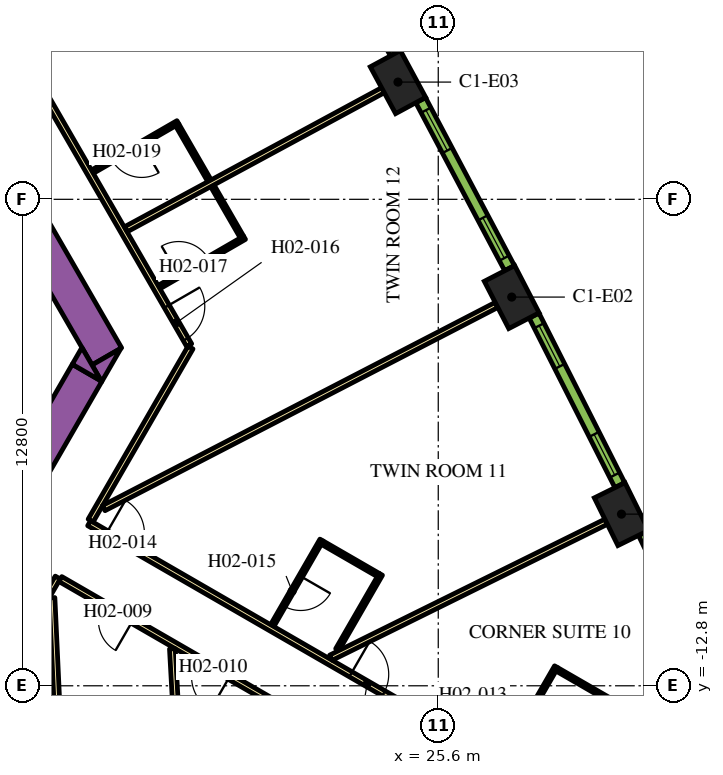
"""IFC4 building model, lengths in metres.
Left out: names, types, materials, properties, quantities, classifications, styles, units other than length and angle.
Written with IfcOpenShell. Run it as: python <this file> out.ifc"""

import sys

from ifc_helpers import new_model, si_unit, direction, frame, frame_2d, origin, origin_2d, place, context, subcontext, project, spatial, polyline, rectangle, outline, extrude, element, fill, save


model = new_model("IFC4")
c1 = context("Model", 3, precision=1e-05, world=origin(), true_north=direction((0.0, 1.0)))
c2 = subcontext(c1, "Body", "Model", "MODEL_VIEW")
j1 = project(units=[si_unit("LENGTHUNIT", "METRE"), si_unit("PLANEANGLEUNIT", "RADIAN")], contexts=[c1])
p1 = place(None, origin())
s1 = spatial("IfcSite", under=j1, at=p1, CompositionType="ELEMENT")
p2 = place(p1, origin())
s2 = spatial("IfcBuilding", under=s1, at=p2, CompositionType="ELEMENT")
p3 = place(p2, frame((0.0, 0.0, 39.3)))
s3 = spatial("IfcBuildingStorey", under=s2, at=p3, CompositionType="ELEMENT", Elevation=39.3)
for number, where, z_axis, x_axis in (
    (1, (30.421, -8.284, 0.0), (0.0, 0.0, 1.0), (-0.443, 0.897, 0.0)),
    (2, (27.533, -2.572, 0.0), (0.0, 0.0, 1.0), (-0.459, 0.888, 0.0)),
    (3, (24.54, 3.085, 0.0), (0.0, 0.0, 1.0), (-0.476, 0.88, 0.0)),
):
    element("IfcColumn", number, at=place(p3, frame(where, z_axis=z_axis, x_axis=x_axis)), inside=s3, PredefinedType="COLUMN", context=c2, shape_type="SweptSolid", body=[
        extrude(rectangle(XDim=1.4, YDim=0.9, at=origin_2d()), origin(), (0.0, 0.0, 1.0), 3.9),
    ])
p4 = place(p3, frame((6.711, 13.476, 0.0), z_axis=(0.0, 0.0, 1.0), x_axis=(0.500002723396, -0.866023831425, 0.0)))
e4 = element("IfcWall", 4, at=p4, inside=s3, PredefinedType="SOLIDWALL", context=c2, shape_type="SweptSolid", body=[
    extrude(rectangle(XDim=20.334, YDim=0.9, at=frame_2d((10.167, 0.0))), origin(), (0.0, 0.0, 1.0), 3.9),
])
p5 = place(p3, origin())
e5 = element("IfcWall", 5, at=p5, inside=s3, PredefinedType="SOLIDWALL", context=c2, shape_type="SweptSolid", body=[
    extrude(outline(polyline([(16.743, -4.8), (16.489, -4.36), (17.251, -3.92), (16.743, -4.8)])), origin(), (0.0, 0.0, 1.0), 3.9),
])
p6 = place(p3, frame((11.695, -12.644, 0.0), z_axis=(0.0, 0.0, 1.0), x_axis=(0.500010229568, 0.86601949766, 0.0)))
e6 = element("IfcWall", 6, at=p6, inside=s3, PredefinedType="SOLIDWALL", context=c2, shape_type="SweptSolid", body=[
    extrude(rectangle(XDim=9.326, YDim=0.9, at=frame_2d((4.663, 0.0))), origin(), (0.0, 0.0, 1.0), 3.9),
])
e7 = element("IfcWall", 7, at=p5, inside=s3, PredefinedType="SOLIDWALL", context=c2, shape_type="SweptSolid", body=[
    extrude(outline(polyline([(16.223, -3.9), (16.732, -4.78), (15.969, -4.34), (16.223, -3.9)])), origin(), (0.0, 0.0, 1.0), 3.9),
])
p7 = place(p3, frame((16.412, -8.523, 0.0), z_axis=(0.0, 0.0, 1.0), x_axis=(0.866022197818, -0.500005552856, 0.0)))
e8 = element("IfcWall", 8, at=p7, inside=s3, PredefinedType="PARTITIONING", context=c2, shape_type="SweptSolid", body=[
    extrude(rectangle(XDim=16.224, YDim=0.15, at=frame_2d((8.112, 0.0))), origin(), (0.0, 0.0, 1.0), 2.75),
])
p8 = place(p7, frame((7.949, 0.0, 0.0)))
e9 = element("IfcOpeningElement", 9, at=p8, cuts=e8, PredefinedType="OPENING", context=c2, shape_type="SweptSolid", body=[
    extrude(rectangle(XDim=1.0, YDim=2.1, at=frame_2d((0.5, 1.05))), frame((0.0, 0.085, 0.0), z_axis=(0.0, -1.0, 0.0), x_axis=(1.0, 0.0, 0.0)), (0.0, 0.0, 1.0), 0.17),
])
p9 = place(p7, frame((0.526, 0.0, 0.0)))
e10 = element("IfcOpeningElement", 10, at=p9, cuts=e8, PredefinedType="OPENING", context=c2, shape_type="SweptSolid", body=[
    extrude(rectangle(XDim=1.0, YDim=2.1, at=frame_2d((0.5, 1.05))), frame((0.0, 0.085, 0.0), z_axis=(0.0, -1.0, 0.0), x_axis=(1.0, 0.0, 0.0)), (0.0, 0.0, 1.0), 0.17),
])
p10 = place(p3, frame((19.081, -3.9, 0.0), z_axis=(0.0, 0.0, 1.0), x_axis=(-0.499974327079, -0.866040225545, 0.0)))
e11 = element("IfcWall", 11, at=p10, inside=s3, PredefinedType="PARTITIONING", context=c2, shape_type="SweptSolid", body=[
    extrude(rectangle(XDim=5.258, YDim=0.15, at=frame_2d((2.629, 0.0))), origin(), (0.0, 0.0, 1.0), 2.75),
])
p11 = place(p3, frame((6.163, 18.475, 0.0), z_axis=(0.0, 0.0, 1.0), x_axis=(0.500001317485, -0.866024643133, 0.0)))
e12 = element("IfcWall", 12, at=p11, inside=s3, PredefinedType="PARTITIONING", context=c2, shape_type="SweptSolid", body=[
    extrude(rectangle(XDim=25.767, YDim=0.15, at=frame_2d((12.883, 0.0))), origin(), (0.0, 0.0, 1.0), 2.75),
])
p12 = place(p11, frame((24.586, 0.0, 0.0)))
e13 = element("IfcOpeningElement", 13, at=p12, cuts=e12, PredefinedType="OPENING", context=c2, shape_type="SweptSolid", body=[
    extrude(rectangle(XDim=1.0, YDim=2.1, at=frame_2d((0.5, 1.05))), frame((0.0, 0.085, 0.0), z_axis=(0.0, -1.0, 0.0), x_axis=(1.0, 0.0, 0.0)), (0.0, 0.0, 1.0), 0.17),
])
p13 = place(p11, frame((16.196, 0.0, 0.0)))
e14 = element("IfcOpeningElement", 14, at=p13, cuts=e12, PredefinedType="OPENING", context=c2, shape_type="SweptSolid", body=[
    extrude(rectangle(XDim=1.0, YDim=2.1, at=frame_2d((0.5, 1.05))), frame((0.0, 0.085, 0.0), z_axis=(0.0, -1.0, 0.0), x_axis=(1.0, 0.0, 0.0)), (0.0, 0.0, 1.0), 0.17),
])
p14 = place(p11, frame((14.789, 0.0, 0.0)))
e15 = element("IfcOpeningElement", 15, at=p14, cuts=e12, PredefinedType="OPENING", context=c2, shape_type="SweptSolid", body=[
    extrude(rectangle(XDim=1.1, YDim=2.1, at=frame_2d((0.55, 1.05))), frame((0.0, 0.085, 0.0), z_axis=(0.0, -1.0, 0.0), x_axis=(1.0, 0.0, 0.0)), (0.0, 0.0, 1.0), 0.17),
])
p15 = place(p11, frame((3.698, 0.0, 0.0)))
e16 = element("IfcOpeningElement", 16, at=p15, cuts=e12, PredefinedType="OPENING", context=c2, shape_type="SweptSolid", body=[
    extrude(rectangle(XDim=1.0, YDim=2.1, at=frame_2d((0.5, 1.05))), frame((0.0, 0.085, 0.0), z_axis=(0.0, -1.0, 0.0), x_axis=(1.0, 0.0, 0.0)), (0.0, 0.0, 1.0), 0.17),
])
p16 = place(p11, frame((2.391, 0.0, 0.0)))
e17 = element("IfcOpeningElement", 17, at=p16, cuts=e12, PredefinedType="OPENING", context=c2, shape_type="SweptSolid", body=[
    extrude(rectangle(XDim=1.0, YDim=2.1, at=frame_2d((0.5, 1.05))), frame((0.0, 0.085, 0.0), z_axis=(0.0, -1.0, 0.0), x_axis=(1.0, 0.0, 0.0)), (0.0, 0.0, 1.0), 0.17),
])
p17 = place(p3, frame((15.587, -9.952, 0.0), z_axis=(0.0, 0.0, 1.0), x_axis=(-0.500016618951, -0.866015808616, 0.0)))
e18 = element("IfcWall", 18, at=p17, inside=s3, PredefinedType="PARTITIONING", context=c2, shape_type="SweptSolid", body=[
    extrude(rectangle(XDim=5.268, YDim=0.15, at=frame_2d((2.634, 0.0))), origin(), (0.0, 0.0, 1.0), 2.75),
])
p18 = place(p17, frame((2.465, 0.0, 0.0)))
e19 = element("IfcOpeningElement", 19, at=p18, cuts=e18, PredefinedType="OPENING", context=c2, shape_type="SweptSolid", body=[
    extrude(rectangle(XDim=0.9, YDim=2.1, at=frame_2d((0.45, 1.05))), frame((0.0, 0.085, 0.0), z_axis=(0.0, -1.0, 0.0), x_axis=(1.0, 0.0, 0.0)), (0.0, 0.0, 1.0), 0.17),
])
p19 = place(p3, frame((29.638, -18.064, 0.0), z_axis=(0.0, 0.0, 1.0), x_axis=(-0.866026175601, 0.499998663172, 0.0)))
e20 = element("IfcWall", 20, at=p19, inside=s3, PredefinedType="PARTITIONING", context=c2, shape_type="SweptSolid", body=[
    extrude(rectangle(XDim=16.144, YDim=0.15, at=frame_2d((8.072, 0.0))), origin(), (0.0, 0.0, 1.0), 2.75),
])
p20 = place(p19, frame((13.948, 0.0, 0.0)))
e21 = element("IfcOpeningElement", 21, at=p20, cuts=e20, PredefinedType="OPENING", context=c2, shape_type="SweptSolid", body=[
    extrude(rectangle(XDim=0.9, YDim=2.1, at=frame_2d((0.45, 1.05))), frame((0.0, 0.085, 0.0), z_axis=(0.0, -1.0, 0.0), x_axis=(1.0, 0.0, 0.0)), (0.0, 0.0, 1.0), 0.17),
])
p21 = place(p19, frame((11.004, 0.0, 0.0)))
e22 = element("IfcOpeningElement", 22, at=p21, cuts=e20, PredefinedType="OPENING", context=c2, shape_type="SweptSolid", body=[
    extrude(rectangle(XDim=1.0, YDim=2.1, at=frame_2d((0.5, 1.05))), frame((0.0, 0.085, 0.0), z_axis=(0.0, -1.0, 0.0), x_axis=(1.0, 0.0, 0.0)), (0.0, 0.0, 1.0), 0.17),
])
p22 = place(p3, frame((15.973, -22.109, 0.0), z_axis=(0.0, 0.0, 1.0), x_axis=(-0.046191717129, 0.998932592955, 0.0)))
e23 = element("IfcWall", 23, at=p22, inside=s3, PredefinedType="PARTITIONING", context=c2, shape_type="SweptSolid", body=[
    extrude(rectangle(XDim=11.638, YDim=0.15, at=frame_2d((5.819, 0.0))), origin(), (0.0, 0.0, 1.0), 2.75),
])
p23 = place(p3, frame((27.134, -2.779, 0.0), z_axis=(0.0, 0.0, 1.0), x_axis=(-0.8882049501, -0.459447457951, 0.0)))
e24 = element("IfcWall", 24, at=p23, inside=s3, PredefinedType="PARTITIONING", context=c2, shape_type="SweptSolid", body=[
    extrude(rectangle(XDim=11.638, YDim=0.15, at=frame_2d((5.819, 0.0))), origin(), (0.0, 0.0, 1.0), 2.75),
])
p24 = place(p3, frame((24.145, 2.871, 0.0), z_axis=(0.0, 0.0, 1.0), x_axis=(-0.879551725039, -0.475803281809, 0.0)))
e25 = element("IfcWall", 25, at=p24, inside=s3, PredefinedType="PARTITIONING", context=c2, shape_type="SweptSolid", body=[
    extrude(rectangle(XDim=7.688, YDim=0.15, at=frame_2d((3.844, 0.0))), origin(), (0.0, 0.0, 1.0), 2.75),
])
p25 = place(p3, frame((19.198, -22.541, 0.0), z_axis=(0.0, 0.0, 1.0), x_axis=(-0.055432210572, 0.99846245299, 0.0)))
e26 = element("IfcWall", 26, at=p25, inside=s3, PredefinedType="PARTITIONING", context=c2, shape_type="SweptSolid", body=[
    extrude(rectangle(XDim=10.729, YDim=0.15, at=frame_2d((5.365, 0.0))), origin(), (0.0, 0.0, 1.0), 2.75),
])
p26 = place(p3, frame((30.018, -8.483, 0.0), z_axis=(0.0, 0.0, 1.0), x_axis=(-0.896544505264, -0.44295366584, 0.0)))
e27 = element("IfcWall", 27, at=p26, inside=s3, PredefinedType="PARTITIONING", context=c2, shape_type="SweptSolid", body=[
    extrude(rectangle(XDim=8.079, YDim=0.15, at=frame_2d((4.04, 0.0))), origin(), (0.0, 0.0, 1.0), 2.75),
])
p27 = place(p3, frame((28.704, -12.3, 0.0), z_axis=(0.0, 0.0, 1.0), x_axis=(-0.49998411664, -0.866034573852, 0.0)))
e28 = element("IfcWall", 28, at=p27, inside=s3, PredefinedType="PARTITIONING", context=c2, shape_type="SweptSolid", body=[
    extrude(rectangle(XDim=2.8, YDim=0.1, at=frame_2d((1.4, 0.0))), origin(), (0.0, 0.0, 1.0), 2.75),
])
p28 = place(p27, frame((1.3, 0.0, 0.0)))
e29 = element("IfcOpeningElement", 29, at=p28, cuts=e28, PredefinedType="OPENING", context=c2, shape_type="SweptSolid", body=[
    extrude(rectangle(XDim=0.9, YDim=2.1, at=frame_2d((0.45, 1.05))), frame((0.0, 0.06, 0.0), z_axis=(0.0, -1.0, 0.0), x_axis=(1.0, 0.0, 0.0)), (0.0, 0.0, 1.0), 0.12),
])
p29 = place(p3, frame((28.722, -12.368, 0.0), z_axis=(0.0, 0.0, 1.0), x_axis=(0.866050077142, -0.499957262057, 0.0)))
e30 = element("IfcWall", 30, at=p29, inside=s3, PredefinedType="PARTITIONING", context=c2, shape_type="SweptSolid", body=[
    extrude(rectangle(XDim=2.4, YDim=0.1, at=frame_2d((1.2, 0.0))), origin(), (0.0, 0.0, 1.0), 2.75),
])
p30 = place(p3, frame((22.53, -8.966, 0.0), z_axis=(0.0, 0.0, 1.0), x_axis=(-0.500006934395, -0.866021400173, 0.0)))
e31 = element("IfcWall", 31, at=p30, inside=s3, PredefinedType="PARTITIONING", context=c2, shape_type="SweptSolid", body=[
    extrude(rectangle(XDim=2.6, YDim=0.1, at=frame_2d((1.3, 0.0))), origin(), (0.0, 0.0, 1.0), 2.75),
])
p31 = place(p30, frame((1.1, 0.0, 0.0)))
e32 = element("IfcOpeningElement", 32, at=p31, cuts=e31, PredefinedType="OPENING", context=c2, shape_type="SweptSolid", body=[
    extrude(rectangle(XDim=0.9, YDim=2.1, at=frame_2d((0.45, 1.05))), frame((0.0, 0.06, 0.0), z_axis=(0.0, -1.0, 0.0), x_axis=(1.0, 0.0, 0.0)), (0.0, 0.0, 1.0), 0.12),
])
p32 = place(p3, frame((22.549, -9.035, 0.0), z_axis=(0.0, 0.0, 1.0), x_axis=(0.86605165483, -0.499954529098, 0.0)))
e33 = element("IfcWall", 33, at=p32, inside=s3, PredefinedType="PARTITIONING", context=c2, shape_type="SweptSolid", body=[
    extrude(rectangle(XDim=1.7, YDim=0.1, at=frame_2d((0.85, 0.0))), origin(), (0.0, 0.0, 1.0), 2.75),
])
p33 = place(p3, frame((22.944, -11.85, 0.0), z_axis=(0.0, 0.0, 1.0), x_axis=(0.499968531483, 0.866043571379, 0.0)))
e34 = element("IfcWall", 34, at=p33, inside=s3, PredefinedType="PARTITIONING", context=c2, shape_type="SweptSolid", body=[
    extrude(rectangle(XDim=2.29, YDim=0.1, at=frame_2d((1.145, 0.0))), origin(), (0.0, 0.0, 1.0), 2.75),
])
p34 = place(p3, frame((18.25, -2.311, 0.0), z_axis=(0.0, 0.0, 1.0), x_axis=(0.866021400173, 0.500006934395, 0.0)))
e35 = element("IfcWall", 35, at=p34, inside=s3, PredefinedType="PARTITIONING", context=c2, shape_type="SweptSolid", body=[
    extrude(rectangle(XDim=2.6, YDim=0.1, at=frame_2d((1.3, 0.0))), origin(), (0.0, 0.0, 1.0), 2.75),
])
p35 = place(p34, frame((0.6, 0.0, 0.0)))
e36 = element("IfcOpeningElement", 36, at=p35, cuts=e35, PredefinedType="OPENING", context=c2, shape_type="SweptSolid", body=[
    extrude(rectangle(XDim=0.9, YDim=2.1, at=frame_2d((0.45, 1.05))), frame((0.0, 0.06, 0.0), z_axis=(0.0, -1.0, 0.0), x_axis=(1.0, 0.0, 0.0)), (0.0, 0.0, 1.0), 0.12),
])
p36 = place(p3, frame((20.434, -0.993, 0.0), z_axis=(0.0, 0.0, 1.0), x_axis=(-0.500086022567, 0.865975732936, 0.0)))
e37 = element("IfcWall", 37, at=p36, inside=s3, PredefinedType="PARTITIONING", context=c2, shape_type="SweptSolid", body=[
    extrude(rectangle(XDim=1.55, YDim=0.1, at=frame_2d((0.775, 0.0))), origin(), (0.0, 0.0, 1.0), 2.75),
])
p37 = place(p3, frame((18.749, 2.026, 0.0), z_axis=(0.0, 0.0, 1.0), x_axis=(-0.866021400173, -0.500006934395, 0.0)))
e38 = element("IfcWall", 38, at=p37, inside=s3, PredefinedType="PARTITIONING", context=c2, shape_type="SweptSolid", body=[
    extrude(rectangle(XDim=2.6, YDim=0.1, at=frame_2d((1.3, 0.0))), origin(), (0.0, 0.0, 1.0), 2.75),
])
p38 = place(p37, frame((1.1, 0.0, 0.0)))
e39 = element("IfcOpeningElement", 39, at=p38, cuts=e38, PredefinedType="OPENING", context=c2, shape_type="SweptSolid", body=[
    extrude(rectangle(XDim=0.9, YDim=2.1, at=frame_2d((0.45, 1.05))), frame((0.0, 0.06, 0.0), z_axis=(0.0, -1.0, 0.0), x_axis=(1.0, 0.0, 0.0)), (0.0, 0.0, 1.0), 0.12),
])
p39 = place(p3, frame((18.731, 1.958, 0.0), z_axis=(0.0, 0.0, 1.0), x_axis=(0.499976720371, -0.866038843867, 0.0)))
e40 = element("IfcWall", 40, at=p39, inside=s3, PredefinedType="PARTITIONING", context=c2, shape_type="SweptSolid", body=[
    extrude(rectangle(XDim=1.69, YDim=0.1, at=frame_2d((0.845, 0.0))), origin(), (0.0, 0.0, 1.0), 2.75),
])
p40 = place(p3, frame((33.176, -13.29, 0.0), z_axis=(0.0, 0.0, 1.0), x_axis=(-0.434664499056, 0.900592456808, 0.0)))
e41 = element("IfcWall", 41, at=p40, inside=s3, PredefinedType="SOLIDWALL", context=c2, shape_type="SweptSolid", body=[
    extrude(rectangle(XDim=5.006, YDim=0.29, at=frame_2d((2.503, 0.0))), origin(), (0.0, 0.0, 1.0), 3.65),
])
p41 = place(p40, frame((0.265, 0.0, 0.9)))
e42 = element("IfcOpeningElement", 42, at=p41, cuts=e41, PredefinedType="OPENING", context=c2, shape_type="SweptSolid", body=[
    extrude(rectangle(XDim=1.2, YDim=2.15, at=frame_2d((0.6, 1.075))), frame((0.0, 0.155, 0.0), z_axis=(0.0, -1.0, 0.0), x_axis=(1.0, 0.0, 0.0)), (0.0, 0.0, 1.0), 0.31),
])
p42 = place(p40, frame((3.496, 0.0, 0.9)))
e43 = element("IfcOpeningElement", 43, at=p42, cuts=e41, PredefinedType="OPENING", context=c2, shape_type="SweptSolid", body=[
    extrude(rectangle(XDim=1.2, YDim=2.15, at=frame_2d((0.6, 1.075))), frame((0.0, 0.155, 0.0), z_axis=(0.0, -1.0, 0.0), x_axis=(1.0, 0.0, 0.0)), (0.0, 0.0, 1.0), 0.31),
])
p43 = place(p3, frame((30.377, -7.521, 0.0), z_axis=(0.0, 0.0, 1.0), x_axis=(-0.451233929645, 0.892405704115, 0.0)))
e44 = element("IfcWall", 44, at=p43, inside=s3, PredefinedType="SOLIDWALL", context=c2, shape_type="SweptSolid", body=[
    extrude(rectangle(XDim=4.998, YDim=0.29, at=frame_2d((2.499, 0.0))), origin(), (0.0, 0.0, 1.0), 3.65),
])
p44 = place(p43, frame((0.297, 0.0, 0.9)))
e45 = element("IfcOpeningElement", 45, at=p44, cuts=e44, PredefinedType="OPENING", context=c2, shape_type="SweptSolid", body=[
    extrude(rectangle(XDim=1.2, YDim=2.15, at=frame_2d((0.6, 1.075))), frame((0.0, 0.155, 0.0), z_axis=(0.0, -1.0, 0.0), x_axis=(1.0, 0.0, 0.0)), (0.0, 0.0, 1.0), 0.31),
])
p45 = place(p43, frame((3.501, 0.0, 0.9)))
e46 = element("IfcOpeningElement", 46, at=p45, cuts=e44, PredefinedType="OPENING", context=c2, shape_type="SweptSolid", body=[
    extrude(rectangle(XDim=1.2, YDim=2.15, at=frame_2d((0.6, 1.075))), frame((0.0, 0.155, 0.0), z_axis=(0.0, -1.0, 0.0), x_axis=(1.0, 0.0, 0.0)), (0.0, 0.0, 1.0), 0.31),
])
p46 = place(p3, frame((27.475, -1.81, 0.0), z_axis=(0.0, 0.0, 1.0), x_axis=(-0.467629620899, 0.883924509026, 0.0)))
e47 = element("IfcWall", 47, at=p46, inside=s3, PredefinedType="SOLIDWALL", context=c2, shape_type="SweptSolid", body=[
    extrude(rectangle(XDim=4.998, YDim=0.29, at=frame_2d((2.499, 0.0))), origin(), (0.0, 0.0, 1.0), 3.65),
])
p47 = place(p46, frame((0.297, 0.0, 0.9)))
e48 = element("IfcOpeningElement", 48, at=p47, cuts=e47, PredefinedType="OPENING", context=c2, shape_type="SweptSolid", body=[
    extrude(rectangle(XDim=1.2, YDim=2.15, at=frame_2d((0.6, 1.075))), frame((0.0, 0.155, 0.0), z_axis=(0.0, -1.0, 0.0), x_axis=(1.0, 0.0, 0.0)), (0.0, 0.0, 1.0), 0.31),
])
p48 = place(p46, frame((3.501, 0.0, 0.9)))
e49 = element("IfcOpeningElement", 49, at=p48, cuts=e47, PredefinedType="OPENING", context=c2, shape_type="SweptSolid", body=[
    extrude(rectangle(XDim=1.2, YDim=2.15, at=frame_2d((0.6, 1.075))), frame((0.0, 0.155, 0.0), z_axis=(0.0, -1.0, 0.0), x_axis=(1.0, 0.0, 0.0)), (0.0, 0.0, 1.0), 0.31),
])
p49 = place(p3, frame((24.468, 3.846, 0.0), z_axis=(0.0, 0.0, 1.0), x_axis=(-0.483912572871, 0.875116347589, 0.0)))
e50 = element("IfcWall", 50, at=p49, inside=s3, PredefinedType="SOLIDWALL", context=c2, shape_type="SweptSolid", body=[
    extrude(rectangle(XDim=4.998, YDim=0.29, at=frame_2d((2.499, 0.0))), origin(), (0.0, 0.0, 1.0), 3.65),
])
p50 = place(p49, frame((0.297, 0.0, 0.9)))
e51 = element("IfcOpeningElement", 51, at=p50, cuts=e50, PredefinedType="OPENING", context=c2, shape_type="SweptSolid", body=[
    extrude(rectangle(XDim=1.2, YDim=2.15, at=frame_2d((0.6, 1.075))), frame((0.0, 0.155, 0.0), z_axis=(0.0, -1.0, 0.0), x_axis=(1.0, 0.0, 0.0)), (0.0, 0.0, 1.0), 0.31),
])
p51 = place(p49, frame((3.501, 0.0, 0.9)))
e52 = element("IfcOpeningElement", 52, at=p51, cuts=e50, PredefinedType="OPENING", context=c2, shape_type="SweptSolid", body=[
    extrude(rectangle(XDim=1.2, YDim=2.15, at=frame_2d((0.6, 1.075))), frame((0.0, 0.155, 0.0), z_axis=(0.0, -1.0, 0.0), x_axis=(1.0, 0.0, 0.0)), (0.0, 0.0, 1.0), 0.31),
])
p52 = place(p20, origin())
e53 = element("IfcDoor", 53, at=p52, inside=s3, OperationType="SINGLE_SWING_RIGHT", PredefinedType="DOOR", context=c2, shape_type="SweptSolid", body=[
    extrude(rectangle(XDim=0.9, YDim=2.1, at=frame_2d((0.45, 1.05))), frame((0.0, 0.025, 0.0), z_axis=(0.0, -1.0, 0.0), x_axis=(1.0, 0.0, 0.0)), (0.0, 0.0, 1.0), 0.05),
])
fill(e21, e53)
p53 = place(p21, origin())
e54 = element("IfcDoor", 54, at=p53, inside=s3, OperationType="SINGLE_SWING_RIGHT", PredefinedType="DOOR", context=c2, shape_type="SweptSolid", body=[
    extrude(rectangle(XDim=1.0, YDim=2.1, at=frame_2d((0.5, 1.05))), frame((0.0, 0.025, 0.0), z_axis=(0.0, -1.0, 0.0), x_axis=(1.0, 0.0, 0.0)), (0.0, 0.0, 1.0), 0.05),
])
fill(e22, e54)
p54 = place(p8, origin())
e55 = element("IfcDoor", 55, at=p54, inside=s3, OperationType="SINGLE_SWING_LEFT", PredefinedType="DOOR", context=c2, shape_type="SweptSolid", body=[
    extrude(rectangle(XDim=1.0, YDim=2.1, at=frame_2d((0.5, 1.05))), frame((0.0, 0.025, 0.0), z_axis=(0.0, -1.0, 0.0), x_axis=(1.0, 0.0, 0.0)), (0.0, 0.0, 1.0), 0.05),
])
fill(e9, e55)
p55 = place(p9, origin())
e56 = element("IfcDoor", 56, at=p55, inside=s3, OperationType="SINGLE_SWING_LEFT", PredefinedType="DOOR", context=c2, shape_type="SweptSolid", body=[
    extrude(rectangle(XDim=1.0, YDim=2.1, at=frame_2d((0.5, 1.05))), frame((0.0, 0.025, 0.0), z_axis=(0.0, -1.0, 0.0), x_axis=(1.0, 0.0, 0.0)), (0.0, 0.0, 1.0), 0.05),
])
fill(e10, e56)
p56 = place(p31, origin())
e57 = element("IfcDoor", 57, at=p56, inside=s3, OperationType="SINGLE_SWING_LEFT", PredefinedType="DOOR", context=c2, shape_type="SweptSolid", body=[
    extrude(rectangle(XDim=0.9, YDim=2.1, at=frame_2d((0.45, 1.05))), frame((0.0, 0.025, 0.0), z_axis=(0.0, -1.0, 0.0), x_axis=(1.0, 0.0, 0.0)), (0.0, 0.0, 1.0), 0.05),
])
fill(e32, e57)
p57 = place(p12, origin())
e58 = element("IfcDoor", 58, at=p57, inside=s3, OperationType="SINGLE_SWING_RIGHT", PredefinedType="DOOR", context=c2, shape_type="SweptSolid", body=[
    extrude(rectangle(XDim=1.0, YDim=2.1, at=frame_2d((0.5, 1.05))), frame((0.0, 0.025, 0.0), z_axis=(0.0, -1.0, 0.0), x_axis=(1.0, 0.0, 0.0)), (0.0, 0.0, 1.0), 0.05),
])
fill(e13, e58)
p58 = place(p35, origin())
e59 = element("IfcDoor", 59, at=p58, inside=s3, OperationType="SINGLE_SWING_RIGHT", PredefinedType="DOOR", context=c2, shape_type="SweptSolid", body=[
    extrude(rectangle(XDim=0.9, YDim=2.1, at=frame_2d((0.45, 1.05))), frame((0.0, 0.025, 0.0), z_axis=(0.0, -1.0, 0.0), x_axis=(1.0, 0.0, 0.0)), (0.0, 0.0, 1.0), 0.05),
])
fill(e36, e59)
p59 = place(p38, origin())
e60 = element("IfcDoor", 60, at=p59, inside=s3, OperationType="SINGLE_SWING_LEFT", PredefinedType="DOOR", context=c2, shape_type="SweptSolid", body=[
    extrude(rectangle(XDim=0.9, YDim=2.1, at=frame_2d((0.45, 1.05))), frame((0.0, 0.025, 0.0), z_axis=(0.0, -1.0, 0.0), x_axis=(1.0, 0.0, 0.0)), (0.0, 0.0, 1.0), 0.05),
])
fill(e39, e60)
p60 = place(p44, origin())
e61 = element("IfcWindow", 61, at=p60, inside=s3, PartitioningType="DOUBLE_PANEL_VERTICAL", PredefinedType="WINDOW", context=c2, shape_type="SweptSolid", body=[
    extrude(rectangle(XDim=1.2, YDim=2.15, at=frame_2d((0.6, 1.075))), frame((0.0, 0.015, 0.0), z_axis=(0.0, -1.0, 0.0), x_axis=(1.0, 0.0, 0.0)), (0.0, 0.0, 1.0), 0.06),
])
fill(e45, e61)
p61 = place(p45, origin())
e62 = element("IfcWindow", 62, at=p61, inside=s3, PartitioningType="DOUBLE_PANEL_VERTICAL", PredefinedType="WINDOW", context=c2, shape_type="SweptSolid", body=[
    extrude(rectangle(XDim=1.2, YDim=2.15, at=frame_2d((0.6, 1.075))), frame((0.0, 0.015, 0.0), z_axis=(0.0, -1.0, 0.0), x_axis=(1.0, 0.0, 0.0)), (0.0, 0.0, 1.0), 0.06),
])
fill(e46, e62)
p62 = place(p47, origin())
e63 = element("IfcWindow", 63, at=p62, inside=s3, PartitioningType="DOUBLE_PANEL_VERTICAL", PredefinedType="WINDOW", context=c2, shape_type="SweptSolid", body=[
    extrude(rectangle(XDim=1.2, YDim=2.15, at=frame_2d((0.6, 1.075))), frame((0.0, 0.015, 0.0), z_axis=(0.0, -1.0, 0.0), x_axis=(1.0, 0.0, 0.0)), (0.0, 0.0, 1.0), 0.06),
])
fill(e48, e63)
p63 = place(p48, origin())
e64 = element("IfcWindow", 64, at=p63, inside=s3, PartitioningType="DOUBLE_PANEL_VERTICAL", PredefinedType="WINDOW", context=c2, shape_type="SweptSolid", body=[
    extrude(rectangle(XDim=1.2, YDim=2.15, at=frame_2d((0.6, 1.075))), frame((0.0, 0.015, 0.0), z_axis=(0.0, -1.0, 0.0), x_axis=(1.0, 0.0, 0.0)), (0.0, 0.0, 1.0), 0.06),
])
fill(e49, e64)
save(model, sys.argv[1])
